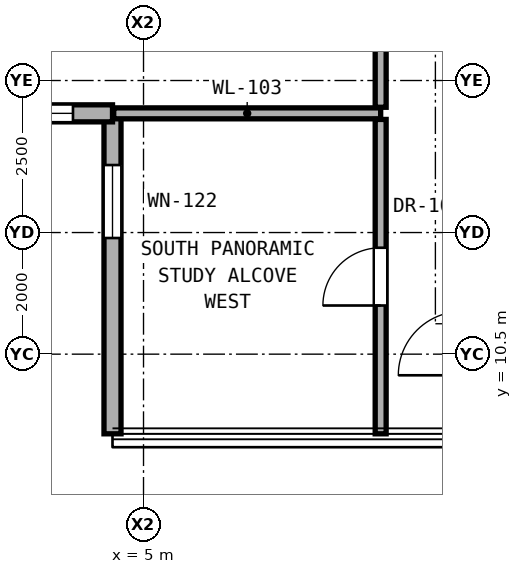
"""IFC4 building model, lengths in metres.
Left out: names, types, materials, properties, quantities, classifications, styles, units other than length and angle.
Written with IfcOpenShell. Run it as: python <this file> out.ifc"""

import sys

from ifc_helpers import new_model, si_unit, direction, frame, frame_2d, origin, place, context, subcontext, project, spatial, rectangle, extrude, element, fill, save


model = new_model("IFC4")
c1 = context("Model", 3, precision=1e-05, world=origin(), true_north=direction((0.0, 1.0)))
c2 = subcontext(c1, "Body", "Model", "MODEL_VIEW")
j1 = project(units=[si_unit("LENGTHUNIT", "METRE"), si_unit("PLANEANGLEUNIT", "RADIAN")], contexts=[c1])
p1 = place(None, origin())
s1 = spatial("IfcSite", under=j1, at=p1, CompositionType="ELEMENT")
p2 = place(p1, origin())
s2 = spatial("IfcBuilding", under=s1, at=p2, CompositionType="ELEMENT")
p3 = place(p2, frame((0.0, 0.0, 134.6)))
s3 = spatial("IfcBuildingStorey", under=s2, at=p3, CompositionType="ELEMENT", Elevation=134.6)
p4 = place(p3, frame((4.49, 14.46, 0.0), z_axis=(0.0, 0.0, 1.0), x_axis=(0.0, -1.0, 0.0)))
e1 = element("IfcWall", 1, at=p4, inside=s3, PredefinedType="SOLIDWALL", context=c2, shape_type="SweptSolid", body=[
    extrude(rectangle(XDim=5.27, YDim=0.28, at=frame_2d((2.635, 0.0))), origin(), (0.0, 0.0, 1.0), 3.06),
])
p5 = place(p4, frame((0.85, 0.0, 0.81)))
e2 = element("IfcOpeningElement", 2, at=p5, cuts=e1, PredefinedType="OPENING", context=c2, shape_type="SweptSolid", body=[
    extrude(rectangle(XDim=1.2, YDim=2.1, at=frame_2d((0.6, 1.05))), frame((0.0, 0.15, 0.0), z_axis=(0.0, -1.0, 0.0), x_axis=(1.0, 0.0, 0.0)), (0.0, 0.0, 1.0), 0.3),
])
p6 = place(p3, frame((-0.78, 14.46, 0.0), z_axis=(0.0, 0.0, 1.0), x_axis=(1.0, 0.0, 0.0)))
e3 = element("IfcWall", 3, at=p6, inside=s3, PredefinedType="SOLIDWALL", context=c2, shape_type="SweptSolid", body=[
    extrude(rectangle(XDim=5.27, YDim=0.28, at=frame_2d((2.635, 0.0))), origin(), (0.0, 0.0, 1.0), 3.06),
])
p7 = place(p6, frame((3.52, 0.0, 0.85)))
e4 = element("IfcOpeningElement", 4, at=p7, cuts=e3, PredefinedType="OPENING", context=c2, shape_type="SweptSolid", body=[
    extrude(rectangle(XDim=1.1, YDim=2.0, at=frame_2d((0.55, 1.0))), frame((0.0, 0.15, 0.0), z_axis=(0.0, -1.0, 0.0), x_axis=(1.0, 0.0, 0.0)), (0.0, 0.0, 1.0), 0.3),
])
p8 = place(p3, frame((4.51, 14.46, 0.0), z_axis=(0.0, 0.0, 1.0), x_axis=(1.0, 0.0, 0.0)))
e5 = element("IfcWall", 5, at=p8, inside=s3, PredefinedType="PARTITIONING", context=c2, shape_type="SweptSolid", body=[
    extrude(rectangle(XDim=4.39, YDim=0.18, at=frame_2d((2.195, 0.0))), origin(), (0.0, 0.0, 1.0), 3.08),
])
p9 = place(p3, frame((8.9, 9.19, 0.0), z_axis=(0.0, 0.0, 1.0), x_axis=(0.0, 1.0, 0.0)))
e6 = element("IfcWall", 6, at=p9, inside=s3, PredefinedType="PARTITIONING", context=c2, shape_type="SweptSolid", body=[
    extrude(rectangle(XDim=5.17, YDim=0.18, at=frame_2d((2.585, 0.0))), origin(), (0.0, 0.0, 1.0), 3.08),
])
p10 = place(p9, frame((2.11, 0.0, 0.0)))
e7 = element("IfcOpeningElement", 7, at=p10, cuts=e6, PredefinedType="OPENING", context=c2, shape_type="SweptSolid", body=[
    extrude(rectangle(XDim=0.95, YDim=2.15, at=frame_2d((0.475, 1.075))), frame((0.0, 0.1, 0.0), z_axis=(0.0, -1.0, 0.0), x_axis=(1.0, 0.0, 0.0)), (0.0, 0.0, 1.0), 0.2),
])
p11 = place(p3, frame((8.9, 14.56, 0.0), z_axis=(0.0, 0.0, 1.0), x_axis=(0.0, 1.0, 0.0)))
e8 = element("IfcWall", 8, at=p11, inside=s3, PredefinedType="PARTITIONING", context=c2, shape_type="SweptSolid", body=[
    extrude(rectangle(XDim=10.62, YDim=0.18, at=frame_2d((5.31, 0.0))), origin(), (0.0, 0.0, 1.0), 2.299),
])
p12 = place(p11, frame((4.785, 0.0, 0.0)))
e9 = element("IfcOpeningElement", 9, at=p12, cuts=e8, PredefinedType="OPENING", context=c2, shape_type="SweptSolid", body=[
    extrude(rectangle(XDim=1.05, YDim=2.2, at=frame_2d((0.525, 1.1))), frame((0.0, 0.1, 0.0), z_axis=(0.0, -1.0, 0.0), x_axis=(1.0, 0.0, 0.0)), (0.0, 0.0, 1.0), 0.2),
])
p13 = place(p5, origin())
e10 = element("IfcWindow", 10, at=p13, inside=s3, PartitioningType="SINGLE_PANEL", PredefinedType="WINDOW", context=c2, shape_type="SweptSolid", body=[
    extrude(rectangle(XDim=1.2, YDim=2.1, at=frame_2d((0.6, 1.05))), frame((0.0, 0.03, 0.0), z_axis=(0.0, -1.0, 0.0), x_axis=(1.0, 0.0, 0.0)), (0.0, 0.0, 1.0), 0.06),
])
fill(e2, e10)
p14 = place(p7, origin())
e11 = element("IfcWindow", 11, at=p14, inside=s3, PartitioningType="SINGLE_PANEL", PredefinedType="WINDOW", context=c2, shape_type="SweptSolid", body=[
    extrude(rectangle(XDim=1.1, YDim=2.0, at=frame_2d((0.55, 1.0))), frame((0.0, 0.03, 0.0), z_axis=(0.0, -1.0, 0.0), x_axis=(1.0, 0.0, 0.0)), (0.0, 0.0, 1.0), 0.06),
])
fill(e4, e11)
p15 = place(p10, origin())
e12 = element("IfcDoor", 12, at=p15, inside=s3, OperationType="SINGLE_SWING_LEFT", PredefinedType="DOOR", context=c2, shape_type="SweptSolid", body=[
    extrude(rectangle(XDim=0.95, YDim=2.15, at=frame_2d((0.475, 1.075))), frame((0.0, 0.025, 0.0), z_axis=(0.0, -1.0, 0.0), x_axis=(1.0, 0.0, 0.0)), (0.0, 0.0, 1.0), 0.05),
])
fill(e7, e12)
save(model, sys.argv[1])
